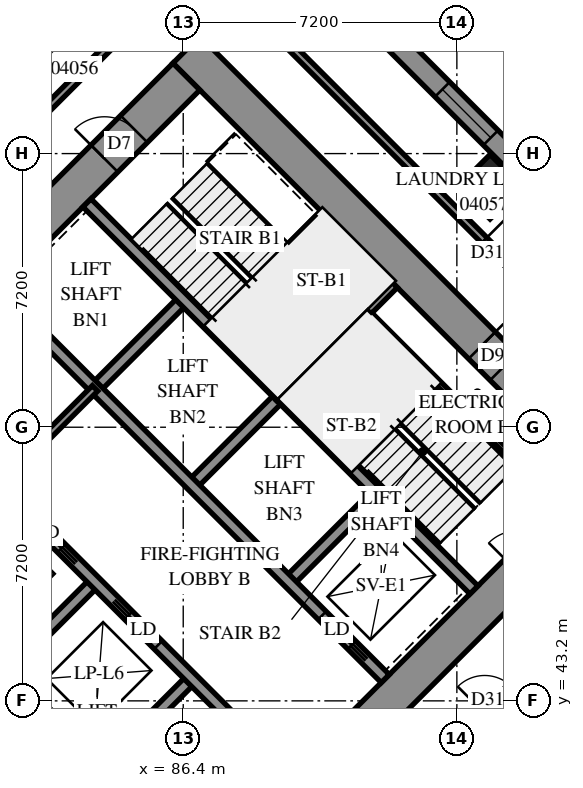
"""IFC4 building model, lengths in metres.
Left out: names, types, materials, properties, quantities, classifications, styles, units other than length and angle.
Written with IfcOpenShell. Run it as: python <this file> out.ifc"""

import sys

from ifc_helpers import new_model, si_unit, direction, frame, frame_2d, origin, origin_2d, place, context, subcontext, project, spatial, polyline, rectangle, outline, extrude, element, fill, save


model = new_model("IFC4")
c1 = context("Model", 3, precision=1e-05, world=origin(), true_north=direction((0.0, 1.0)))
c2 = subcontext(c1, "Body", "Model", "MODEL_VIEW")
j1 = project(units=[si_unit("LENGTHUNIT", "METRE"), si_unit("PLANEANGLEUNIT", "RADIAN")], contexts=[c1])
p1 = place(None, origin())
s1 = spatial("IfcSite", under=j1, at=p1, CompositionType="ELEMENT")
p2 = place(p1, origin())
s2 = spatial("IfcBuilding", under=s1, at=p2, CompositionType="ELEMENT")
p3 = place(p2, frame((0.0, 0.0, 18.6)))
s3 = spatial("IfcBuildingStorey", under=s2, at=p3, CompositionType="ELEMENT", Elevation=18.6)
p4 = place(p3, frame((94.474, 56.727, 0.0), z_axis=(0.0, 0.0, 1.0), x_axis=(0.7071067812, -0.7071067812, 0.0)))
e1 = element("IfcColumn", 1, at=p4, inside=s3, PredefinedType="COLUMN", context=c2, shape_type="SweptSolid", body=[
    extrude(rectangle(XDim=1.2, YDim=1.2, at=origin_2d()), origin(), (0.0, 0.0, 1.0), 3.8),
])
p5 = place(p3, frame((75.594, 49.443, -0.4), z_axis=(0.0, 0.0, 1.0), x_axis=(0.7071037324, -0.70710983, 0.0)))
e2 = element("IfcWall", 2, at=p5, inside=s3, PredefinedType="SHEAR", context=c2, shape_type="SweptSolid", body=[
    extrude(rectangle(XDim=16.4, YDim=1.0, at=frame_2d((8.2, 0.0))), origin(), (0.0, 0.0, 1.0), 3.5),
])
p6 = place(p3, frame((86.483, 60.333, -0.4), z_axis=(0.0, 0.0, 1.0), x_axis=(0.70710983, -0.7071037324, 0.0)))
e3 = element("IfcWall", 3, at=p6, inside=s3, PredefinedType="SHEAR", context=c2, shape_type="SweptSolid", body=[
    extrude(rectangle(XDim=16.4, YDim=1.0, at=frame_2d((8.2, 0.0))), origin(), (0.0, 0.0, 1.0), 3.5),
])
p7 = place(p6, frame((11.0, 0.0, 0.4)))
e4 = element("IfcOpeningElement", 4, at=p7, cuts=e3, PredefinedType="OPENING", context=c2, shape_type="SweptSolid", body=[
    extrude(rectangle(XDim=0.8, YDim=2.1, at=frame_2d((0.4, 1.05))), frame((0.0, 0.51, 0.0), z_axis=(0.0, -1.0, 0.0), x_axis=(1.0, 0.0, 0.0)), (0.0, 0.0, 1.0), 1.02),
])
p8 = place(p3, frame((76.301, 49.443, -0.4), z_axis=(0.0, 0.0, 1.0), x_axis=(0.7071067812, 0.7071067812, 0.0)))
e5 = element("IfcWall", 5, at=p8, inside=s3, PredefinedType="SHEAR", context=c2, shape_type="SweptSolid", body=[
    extrude(rectangle(XDim=14.4, YDim=1.0, at=frame_2d((7.2, 0.0))), origin(), (0.0, 0.0, 1.0), 3.5),
])
p9 = place(p8, frame((4.55, 0.0, 0.4)))
e6 = element("IfcOpeningElement", 6, at=p9, cuts=e5, PredefinedType="OPENING", context=c2, shape_type="SweptSolid", body=[
    extrude(rectangle(XDim=1.1, YDim=2.1, at=frame_2d((0.55, 1.05))), frame((0.0, 0.51, 0.0), z_axis=(0.0, -1.0, 0.0), x_axis=(1.0, 0.0, 0.0)), (0.0, 0.0, 1.0), 1.02),
])
p10 = place(p8, frame((11.35, 0.0, 0.4)))
e7 = element("IfcOpeningElement", 7, at=p10, cuts=e5, PredefinedType="OPENING", context=c2, shape_type="SweptSolid", body=[
    extrude(rectangle(XDim=1.1, YDim=2.1, at=frame_2d((0.55, 1.05))), frame((0.0, 0.51, 0.0), z_axis=(0.0, -1.0, 0.0), x_axis=(1.0, 0.0, 0.0)), (0.0, 0.0, 1.0), 1.02),
])
p11 = place(p3, frame((87.19, 38.554, -0.4), z_axis=(0.0, 0.0, 1.0), x_axis=(0.707103309, 0.7071102534, 0.0)))
e8 = element("IfcWall", 8, at=p11, inside=s3, PredefinedType="SHEAR", context=c2, shape_type="SweptSolid", body=[
    extrude(rectangle(XDim=14.4, YDim=1.0, at=frame_2d((7.2, 0.0))), origin(), (0.0, 0.0, 1.0), 3.5),
])
p12 = place(p11, frame((4.55, 0.0, 0.4)))
e9 = element("IfcOpeningElement", 9, at=p12, cuts=e8, PredefinedType="OPENING", context=c2, shape_type="SweptSolid", body=[
    extrude(rectangle(XDim=1.1, YDim=2.1, at=frame_2d((0.55, 1.05))), frame((0.0, 0.51, 0.0), z_axis=(0.0, -1.0, 0.0), x_axis=(1.0, 0.0, 0.0)), (0.0, 0.0, 1.0), 1.02),
])
p13 = place(p11, frame((11.35, 0.0, 0.4)))
e10 = element("IfcOpeningElement", 10, at=p13, cuts=e8, PredefinedType="OPENING", context=c2, shape_type="SweptSolid", body=[
    extrude(rectangle(XDim=1.1, YDim=2.1, at=frame_2d((0.55, 1.05))), frame((0.0, 0.51, 0.0), z_axis=(0.0, -1.0, 0.0), x_axis=(1.0, 0.0, 0.0)), (0.0, 0.0, 1.0), 1.02),
])
p14 = place(p3, frame((84.079, 51.423, 0.0), z_axis=(0.0, 0.0, 1.0), x_axis=(0.7071219326, 0.7070916295, 0.0)))
e11 = element("IfcWall", 11, at=p14, inside=s3, PredefinedType="SOLIDWALL", context=c2, shape_type="SweptSolid", body=[
    extrude(rectangle(XDim=3.3, YDim=0.3, at=frame_2d((1.65, 0.0))), origin(), (0.0, 0.0, 1.0), 3.8),
])
p15 = place(p3, frame((81.746, 43.999, 0.0), z_axis=(0.0, 0.0, 1.0), x_axis=(0.7071067812, 0.7071067812, 0.0)))
e12 = element("IfcWall", 12, at=p15, inside=s3, PredefinedType="SOLIDWALL", context=c2, shape_type="SweptSolid", body=[
    extrude(rectangle(XDim=3.3, YDim=0.3, at=frame_2d((1.65, 0.0))), origin(), (0.0, 0.0, 1.0), 3.8),
])
p16 = place(p3, frame((86.625, 48.878, 0.0), z_axis=(0.0, 0.0, 1.0), x_axis=(0.7071067812, 0.7071067812, 0.0)))
e13 = element("IfcWall", 13, at=p16, inside=s3, PredefinedType="SOLIDWALL", context=c2, shape_type="SweptSolid", body=[
    extrude(rectangle(XDim=3.3, YDim=0.3, at=frame_2d((1.65, 0.0))), origin(), (0.0, 0.0, 1.0), 3.8),
])
p17 = place(p3, frame((84.291, 41.453, 0.0), z_axis=(0.0, 0.0, 1.0), x_axis=(0.7071067812, 0.7071067812, 0.0)))
e14 = element("IfcWall", 14, at=p17, inside=s3, PredefinedType="SOLIDWALL", context=c2, shape_type="SweptSolid", body=[
    extrude(rectangle(XDim=3.3, YDim=0.3, at=frame_2d((1.65, 0.0))), origin(), (0.0, 0.0, 1.0), 3.8),
])
p18 = place(p3, frame((89.17, 46.332, 0.0), z_axis=(0.0, 0.0, 1.0), x_axis=(0.7071067812, 0.7071067812, 0.0)))
e15 = element("IfcWall", 15, at=p18, inside=s3, PredefinedType="SOLIDWALL", context=c2, shape_type="SweptSolid", body=[
    extrude(rectangle(XDim=3.3, YDim=0.3, at=frame_2d((1.65, 0.0))), origin(), (0.0, 0.0, 1.0), 3.8),
])
p19 = place(p3, frame((78.988, 51.423, 0.0), z_axis=(0.0, 0.0, 1.0), x_axis=(0.7071067812, -0.7071067812, 0.0)))
e16 = element("IfcWall", 16, at=p19, inside=s3, PredefinedType="SOLIDWALL", context=c2, shape_type="SweptSolid", body=[
    extrude(rectangle(XDim=14.4, YDim=0.3, at=frame_2d((7.2, 0.0))), origin(), (0.0, 0.0, 1.0), 3.8),
])
p20 = place(p19, frame((1.25, 0.0, 0.0)))
e17 = element("IfcOpeningElement", 17, at=p20, cuts=e16, PredefinedType="OPENING", context=c2, shape_type="SweptSolid", body=[
    extrude(rectangle(XDim=1.1, YDim=2.1, at=frame_2d((0.55, 1.05))), frame((0.0, 0.16, 0.0), z_axis=(0.0, -1.0, 0.0), x_axis=(1.0, 0.0, 0.0)), (0.0, 0.0, 1.0), 0.32),
])
p21 = place(p19, frame((4.85, 0.0, 0.0)))
e18 = element("IfcOpeningElement", 18, at=p21, cuts=e16, PredefinedType="OPENING", context=c2, shape_type="SweptSolid", body=[
    extrude(rectangle(XDim=1.1, YDim=2.1, at=frame_2d((0.55, 1.05))), frame((0.0, 0.16, 0.0), z_axis=(0.0, -1.0, 0.0), x_axis=(1.0, 0.0, 0.0)), (0.0, 0.0, 1.0), 0.32),
])
p22 = place(p19, frame((8.45, 0.0, 0.0)))
e19 = element("IfcOpeningElement", 19, at=p22, cuts=e16, PredefinedType="OPENING", context=c2, shape_type="SweptSolid", body=[
    extrude(rectangle(XDim=1.1, YDim=2.1, at=frame_2d((0.55, 1.05))), frame((0.0, 0.16, 0.0), z_axis=(0.0, -1.0, 0.0), x_axis=(1.0, 0.0, 0.0)), (0.0, 0.0, 1.0), 0.32),
])
p23 = place(p19, frame((12.05, 0.0, 0.0)))
e20 = element("IfcOpeningElement", 20, at=p23, cuts=e16, PredefinedType="OPENING", context=c2, shape_type="SweptSolid", body=[
    extrude(rectangle(XDim=1.1, YDim=2.1, at=frame_2d((0.55, 1.05))), frame((0.0, 0.16, 0.0), z_axis=(0.0, -1.0, 0.0), x_axis=(1.0, 0.0, 0.0)), (0.0, 0.0, 1.0), 0.32),
])
p24 = place(p3, frame((81.534, 53.969, 0.0), z_axis=(0.0, 0.0, 1.0), x_axis=(0.707103309, -0.7071102534, 0.0)))
e21 = element("IfcWall", 21, at=p24, inside=s3, PredefinedType="SOLIDWALL", context=c2, shape_type="SweptSolid", body=[
    extrude(rectangle(XDim=14.4, YDim=0.3, at=frame_2d((7.2, 0.0))), origin(), (0.0, 0.0, 1.0), 3.8),
])
p25 = place(p24, frame((12.05, 0.0, 0.0)))
e22 = element("IfcOpeningElement", 22, at=p25, cuts=e21, PredefinedType="OPENING", context=c2, shape_type="SweptSolid", body=[
    extrude(rectangle(XDim=1.1, YDim=2.1, at=frame_2d((0.55, 1.05))), frame((0.0, 0.16, 0.0), z_axis=(0.0, -1.0, 0.0), x_axis=(1.0, 0.0, 0.0)), (0.0, 0.0, 1.0), 0.32),
])
for number, where, z_axis, x_axis in (
    (23, (83.867, 56.302, 0.0), (0.0, 0.0, 1.0), (0.707, -0.707, 0.0)),
    (24, (88.958, 51.211, 0.0), (0.0, 0.0, 1.0), (0.707, -0.707, 0.0)),
):
    element("IfcWall", number, at=place(p3, frame(where, z_axis=z_axis, x_axis=x_axis)), inside=s3, PredefinedType="SOLIDWALL", context=c2, shape_type="SweptSolid", body=[
        extrude(rectangle(XDim=7.2, YDim=0.3, at=frame_2d((3.6, 0.0))), origin(), (0.0, 0.0, 1.0), 3.8),
    ])
p26 = place(p3, frame((88.958, 51.211, 0.0), z_axis=(0.0, 0.0, 1.0), x_axis=(0.7071067812, 0.7071067812, 0.0)))
e25 = element("IfcWall", 25, at=p26, inside=s3, PredefinedType="SOLIDWALL", context=c2, shape_type="SweptSolid", body=[
    extrude(rectangle(XDim=4.2, YDim=0.3, at=frame_2d((2.1, 0.0))), origin(), (0.0, 0.0, 1.0), 3.8),
])
p27 = place(p3, frame((117.843, 34.665, 0.0), z_axis=(0.0, 0.0, 1.0), x_axis=(-0.7071067812, 0.7071067812, 0.0)))
e26 = element("IfcWall", 26, at=p27, inside=s3, PredefinedType="SOLIDWALL", context=c2, shape_type="SweptSolid", body=[
    extrude(outline(polyline([(-0.275, -0.275), (54.222, -0.275), (53.994, 0.275), (0.275, 0.275), (-0.275, -0.275)])), origin(), (0.0, 0.0, 1.0), 3.8),
])
p28 = place(p27, frame((0.8, 0.0, 0.7)))
e27 = element("IfcOpeningElement", 27, at=p28, cuts=e26, PredefinedType="OPENING", context=c2, shape_type="SweptSolid", body=[
    extrude(rectangle(XDim=1.8, YDim=2.4, at=frame_2d((0.9, 1.2))), frame((0.0, 0.285, 0.0), z_axis=(0.0, -1.0, 0.0), x_axis=(1.0, 0.0, 0.0)), (0.0, 0.0, 1.0), 0.57),
])
p29 = place(p27, frame((4.225, 0.0, 0.7)))
e28 = element("IfcOpeningElement", 28, at=p29, cuts=e26, PredefinedType="OPENING", context=c2, shape_type="SweptSolid", body=[
    extrude(rectangle(XDim=1.8, YDim=2.4, at=frame_2d((0.9, 1.2))), frame((0.0, 0.285, 0.0), z_axis=(0.0, -1.0, 0.0), x_axis=(1.0, 0.0, 0.0)), (0.0, 0.0, 1.0), 0.57),
])
p30 = place(p27, frame((7.825, 0.0, 0.7)))
e29 = element("IfcOpeningElement", 29, at=p30, cuts=e26, PredefinedType="OPENING", context=c2, shape_type="SweptSolid", body=[
    extrude(rectangle(XDim=1.8, YDim=2.4, at=frame_2d((0.9, 1.2))), frame((0.0, 0.285, 0.0), z_axis=(0.0, -1.0, 0.0), x_axis=(1.0, 0.0, 0.0)), (0.0, 0.0, 1.0), 0.57),
])
p31 = place(p27, frame((11.425, 0.0, 0.7)))
e30 = element("IfcOpeningElement", 30, at=p31, cuts=e26, PredefinedType="OPENING", context=c2, shape_type="SweptSolid", body=[
    extrude(rectangle(XDim=1.8, YDim=2.4, at=frame_2d((0.9, 1.2))), frame((0.0, 0.285, 0.0), z_axis=(0.0, -1.0, 0.0), x_axis=(1.0, 0.0, 0.0)), (0.0, 0.0, 1.0), 0.57),
])
p32 = place(p27, frame((15.025, 0.0, 0.7)))
e31 = element("IfcOpeningElement", 31, at=p32, cuts=e26, PredefinedType="OPENING", context=c2, shape_type="SweptSolid", body=[
    extrude(rectangle(XDim=1.8, YDim=2.4, at=frame_2d((0.9, 1.2))), frame((0.0, 0.285, 0.0), z_axis=(0.0, -1.0, 0.0), x_axis=(1.0, 0.0, 0.0)), (0.0, 0.0, 1.0), 0.57),
])
p33 = place(p27, frame((18.625, 0.0, 0.7)))
e32 = element("IfcOpeningElement", 32, at=p33, cuts=e26, PredefinedType="OPENING", context=c2, shape_type="SweptSolid", body=[
    extrude(rectangle(XDim=1.8, YDim=2.4, at=frame_2d((0.9, 1.2))), frame((0.0, 0.285, 0.0), z_axis=(0.0, -1.0, 0.0), x_axis=(1.0, 0.0, 0.0)), (0.0, 0.0, 1.0), 0.57),
])
p34 = place(p27, frame((22.225, 0.0, 0.7)))
e33 = element("IfcOpeningElement", 33, at=p34, cuts=e26, PredefinedType="OPENING", context=c2, shape_type="SweptSolid", body=[
    extrude(rectangle(XDim=1.8, YDim=2.4, at=frame_2d((0.9, 1.2))), frame((0.0, 0.285, 0.0), z_axis=(0.0, -1.0, 0.0), x_axis=(1.0, 0.0, 0.0)), (0.0, 0.0, 1.0), 0.57),
])
p35 = place(p27, frame((25.825, 0.0, 0.7)))
e34 = element("IfcOpeningElement", 34, at=p35, cuts=e26, PredefinedType="OPENING", context=c2, shape_type="SweptSolid", body=[
    extrude(rectangle(XDim=1.8, YDim=2.4, at=frame_2d((0.9, 1.2))), frame((0.0, 0.285, 0.0), z_axis=(0.0, -1.0, 0.0), x_axis=(1.0, 0.0, 0.0)), (0.0, 0.0, 1.0), 0.57),
])
p36 = place(p27, frame((29.425, 0.0, 0.7)))
e35 = element("IfcOpeningElement", 35, at=p36, cuts=e26, PredefinedType="OPENING", context=c2, shape_type="SweptSolid", body=[
    extrude(rectangle(XDim=1.8, YDim=2.4, at=frame_2d((0.9, 1.2))), frame((0.0, 0.285, 0.0), z_axis=(0.0, -1.0, 0.0), x_axis=(1.0, 0.0, 0.0)), (0.0, 0.0, 1.0), 0.57),
])
p37 = place(p27, frame((33.025, 0.0, 0.7)))
e36 = element("IfcOpeningElement", 36, at=p37, cuts=e26, PredefinedType="OPENING", context=c2, shape_type="SweptSolid", body=[
    extrude(rectangle(XDim=1.8, YDim=2.4, at=frame_2d((0.9, 1.2))), frame((0.0, 0.285, 0.0), z_axis=(0.0, -1.0, 0.0), x_axis=(1.0, 0.0, 0.0)), (0.0, 0.0, 1.0), 0.57),
])
p38 = place(p27, frame((36.625, 0.0, 0.7)))
e37 = element("IfcOpeningElement", 37, at=p38, cuts=e26, PredefinedType="OPENING", context=c2, shape_type="SweptSolid", body=[
    extrude(rectangle(XDim=1.8, YDim=2.4, at=frame_2d((0.9, 1.2))), frame((0.0, 0.285, 0.0), z_axis=(0.0, -1.0, 0.0), x_axis=(1.0, 0.0, 0.0)), (0.0, 0.0, 1.0), 0.57),
])
p39 = place(p27, frame((40.225, 0.0, 0.7)))
e38 = element("IfcOpeningElement", 38, at=p39, cuts=e26, PredefinedType="OPENING", context=c2, shape_type="SweptSolid", body=[
    extrude(rectangle(XDim=1.8, YDim=2.4, at=frame_2d((0.9, 1.2))), frame((0.0, 0.285, 0.0), z_axis=(0.0, -1.0, 0.0), x_axis=(1.0, 0.0, 0.0)), (0.0, 0.0, 1.0), 0.57),
])
p40 = place(p27, frame((43.825, 0.0, 0.7)))
e39 = element("IfcOpeningElement", 39, at=p40, cuts=e26, PredefinedType="OPENING", context=c2, shape_type="SweptSolid", body=[
    extrude(rectangle(XDim=1.8, YDim=2.4, at=frame_2d((0.9, 1.2))), frame((0.0, 0.285, 0.0), z_axis=(0.0, -1.0, 0.0), x_axis=(1.0, 0.0, 0.0)), (0.0, 0.0, 1.0), 0.57),
])
p41 = place(p27, frame((47.425, 0.0, 0.7)))
e40 = element("IfcOpeningElement", 40, at=p41, cuts=e26, PredefinedType="OPENING", context=c2, shape_type="SweptSolid", body=[
    extrude(rectangle(XDim=1.8, YDim=2.4, at=frame_2d((0.9, 1.2))), frame((0.0, 0.285, 0.0), z_axis=(0.0, -1.0, 0.0), x_axis=(1.0, 0.0, 0.0)), (0.0, 0.0, 1.0), 0.57),
])
p42 = place(p27, frame((51.06, 0.0, 0.7)))
e41 = element("IfcOpeningElement", 41, at=p42, cuts=e26, PredefinedType="OPENING", context=c2, shape_type="SweptSolid", body=[
    extrude(rectangle(XDim=1.8, YDim=2.4, at=frame_2d((0.9, 1.2))), frame((0.0, 0.285, 0.0), z_axis=(0.0, -1.0, 0.0), x_axis=(1.0, 0.0, 0.0)), (0.0, 0.0, 1.0), 0.57),
])
p43 = place(p3, frame((91.313, 53.354, 0.0), z_axis=(0.0, 0.0, 1.0), x_axis=(0.7071140275, -0.7070995348, 0.0)))
e42 = element("IfcWall", 42, at=p43, inside=s3, PredefinedType="PARTITIONING", context=c2, shape_type="SweptSolid", body=[
    extrude(rectangle(XDim=6.9, YDim=0.15, at=frame_2d((3.45, 0.0))), origin(), (0.0, 0.0, 1.0), 3.8),
])
p44 = place(p3, frame((81.534, 48.878, 0.0), z_axis=(0.0, 0.0, 1.0), x_axis=(0.707092892, 0.7071206701, 0.0)))
e43 = element("IfcWall", 43, at=p44, inside=s3, PredefinedType="PARTITIONING", context=c2, shape_type="SweptSolid", body=[
    extrude(rectangle(XDim=3.6, YDim=0.2, at=frame_2d((1.8, 0.0))), origin(), (0.0, 0.0, 1.0), 3.8),
])
p45 = place(p3, frame((86.833, 62.805, 0.0), z_axis=(0.0, 0.0, 1.0), x_axis=(0.7072045138, -0.7070090351, 0.0)))
e44 = element("IfcWall", 44, at=p45, inside=s3, PredefinedType="PARTITIONING", context=c2, shape_type="SweptSolid", body=[
    extrude(rectangle(XDim=13.301, YDim=0.2, at=frame_2d((6.65, 0.0))), origin(), (0.0, 0.0, 1.0), 3.8),
])
p46 = place(p45, frame((10.586, 0.0, 0.0)))
e45 = element("IfcOpeningElement", 45, at=p46, cuts=e44, PredefinedType="OPENING", context=c2, shape_type="SweptSolid", body=[
    extrude(rectangle(XDim=1.0, YDim=2.1, at=frame_2d((0.5, 1.05))), frame((0.0, 0.11, 0.0), z_axis=(0.0, -1.0, 0.0), x_axis=(1.0, 0.0, 0.0)), (0.0, 0.0, 1.0), 0.22),
])
p47 = place(p3, frame((94.226, 42.762, 0.0), z_axis=(0.0, 0.0, 1.0), x_axis=(0.7071067812, 0.7071067812, 0.0)))
e46 = element("IfcWall", 46, at=p47, inside=s3, PredefinedType="PARTITIONING", context=c2, shape_type="SweptSolid", body=[
    extrude(rectangle(XDim=8.949, YDim=0.2, at=frame_2d((4.474, 0.0))), origin(), (0.0, 0.0, 1.0), 3.8),
])
p48 = place(p47, frame((0.149, 0.0, 0.0)))
e47 = element("IfcOpeningElement", 47, at=p48, cuts=e46, PredefinedType="OPENING", context=c2, shape_type="SweptSolid", body=[
    extrude(rectangle(XDim=1.0, YDim=2.1, at=frame_2d((0.5, 1.05))), frame((0.0, 0.11, 0.0), z_axis=(0.0, -1.0, 0.0), x_axis=(1.0, 0.0, 0.0)), (0.0, 0.0, 1.0), 0.22),
])
p49 = place(p3, frame((81.049, 58.577, 0.0), z_axis=(0.0, 0.0, 1.0), x_axis=(0.7071124411, 0.7071011213, 0.0)))
e48 = element("IfcWall", 48, at=p49, inside=s3, PredefinedType="PARTITIONING", context=c2, shape_type="SweptSolid", body=[
    extrude(rectangle(XDim=8.834, YDim=0.2, at=frame_2d((4.417, 0.0))), origin(), (0.0, 0.0, 1.0), 3.8),
])
p50 = place(p3, frame((81.053, 57.021, 0.0), z_axis=(0.0, 0.0, 1.0), x_axis=(0.7069845395, 0.7072290017, 0.0)))
e49 = element("IfcWall", 49, at=p50, inside=s3, PredefinedType="PARTITIONING", context=c2, shape_type="SweptSolid", body=[
    extrude(rectangle(XDim=8.181, YDim=0.2, at=frame_2d((4.091, 0.0))), origin(), (0.0, 0.0, 1.0), 3.8),
])
p51 = place(p50, frame((0.863, 0.0, 0.0)))
e50 = element("IfcOpeningElement", 50, at=p51, cuts=e49, PredefinedType="OPENING", context=c2, shape_type="SweptSolid", body=[
    extrude(rectangle(XDim=1.0, YDim=2.1, at=frame_2d((0.5, 1.05))), frame((0.0, 0.11, 0.0), z_axis=(0.0, -1.0, 0.0), x_axis=(1.0, 0.0, 0.0)), (0.0, 0.0, 1.0), 0.22),
])
p52 = place(p37, origin())
e51 = element("IfcWindow", 51, at=p52, inside=s3, PartitioningType="SINGLE_PANEL", PredefinedType="WINDOW", context=c2, shape_type="SweptSolid", body=[
    extrude(rectangle(XDim=1.8, YDim=2.4, at=frame_2d((0.9, 1.2))), frame((0.0, 0.155, 0.0), z_axis=(0.0, -1.0, 0.0), x_axis=(1.0, 0.0, 0.0)), (0.0, 0.0, 1.0), 0.06),
])
fill(e36, e51)
p53 = place(p7, origin())
e52 = element("IfcDoor", 52, at=p53, inside=s3, OperationType="SINGLE_SWING_RIGHT", PredefinedType="DOOR", context=c2, shape_type="SweptSolid", body=[
    extrude(rectangle(XDim=0.8, YDim=2.1, at=frame_2d((0.4, 1.05))), frame((0.0, -0.44, 0.0), z_axis=(0.0, -1.0, 0.0), x_axis=(1.0, 0.0, 0.0)), (0.0, 0.0, 1.0), 0.05),
])
fill(e4, e52)
p54 = place(p10, origin())
e53 = element("IfcDoor", 53, at=p54, inside=s3, OperationType="SINGLE_SWING_LEFT", PredefinedType="DOOR", context=c2, shape_type="SweptSolid", body=[
    extrude(rectangle(XDim=1.1, YDim=2.1, at=frame_2d((0.55, 1.05))), frame((0.0, 0.025, 0.0), z_axis=(0.0, -1.0, 0.0), x_axis=(1.0, 0.0, 0.0)), (0.0, 0.0, 1.0), 0.05),
])
fill(e7, e53)
p55 = place(p21, origin())
e54 = element("IfcDoor", 54, at=p55, inside=s3, OperationType="SLIDING_TO_RIGHT", PredefinedType="DOOR", context=c2, shape_type="SweptSolid", body=[
    extrude(rectangle(XDim=1.1, YDim=2.1, at=frame_2d((0.55, 1.05))), frame((0.0, 0.025, 0.0), z_axis=(0.0, -1.0, 0.0), x_axis=(1.0, 0.0, 0.0)), (0.0, 0.0, 1.0), 0.05),
])
fill(e18, e54)
p56 = place(p22, origin())
e55 = element("IfcDoor", 55, at=p56, inside=s3, OperationType="SLIDING_TO_LEFT", PredefinedType="DOOR", context=c2, shape_type="SweptSolid", body=[
    extrude(rectangle(XDim=1.1, YDim=2.1, at=frame_2d((0.55, 1.05))), frame((0.0, 0.025, 0.0), z_axis=(0.0, -1.0, 0.0), x_axis=(1.0, 0.0, 0.0)), (0.0, 0.0, 1.0), 0.05),
])
fill(e19, e55)
p57 = place(p25, origin())
e56 = element("IfcDoor", 56, at=p57, inside=s3, OperationType="SLIDING_TO_RIGHT", PredefinedType="DOOR", context=c2, shape_type="SweptSolid", body=[
    extrude(rectangle(XDim=1.1, YDim=2.1, at=frame_2d((0.55, 1.05))), frame((0.0, 0.025, 0.0), z_axis=(0.0, -1.0, 0.0), x_axis=(1.0, 0.0, 0.0)), (0.0, 0.0, 1.0), 0.05),
])
fill(e22, e56)
p58 = place(p46, origin())
e57 = element("IfcDoor", 57, at=p58, inside=s3, OperationType="SINGLE_SWING_LEFT", PredefinedType="DOOR", context=c2, shape_type="SweptSolid", body=[
    extrude(rectangle(XDim=1.0, YDim=2.1, at=frame_2d((0.5, 1.05))), frame((0.0, 0.025, 0.0), z_axis=(0.0, -1.0, 0.0), x_axis=(1.0, 0.0, 0.0)), (0.0, 0.0, 1.0), 0.05),
])
fill(e45, e57)
p59 = place(p48, origin())
e58 = element("IfcDoor", 58, at=p59, inside=s3, OperationType="SINGLE_SWING_LEFT", PredefinedType="DOOR", context=c2, shape_type="SweptSolid", body=[
    extrude(rectangle(XDim=1.0, YDim=2.1, at=frame_2d((0.5, 1.05))), frame((0.0, 0.025, 0.0), z_axis=(0.0, -1.0, 0.0), x_axis=(1.0, 0.0, 0.0)), (0.0, 0.0, 1.0), 0.05),
])
fill(e47, e58)
save(model, sys.argv[1])
